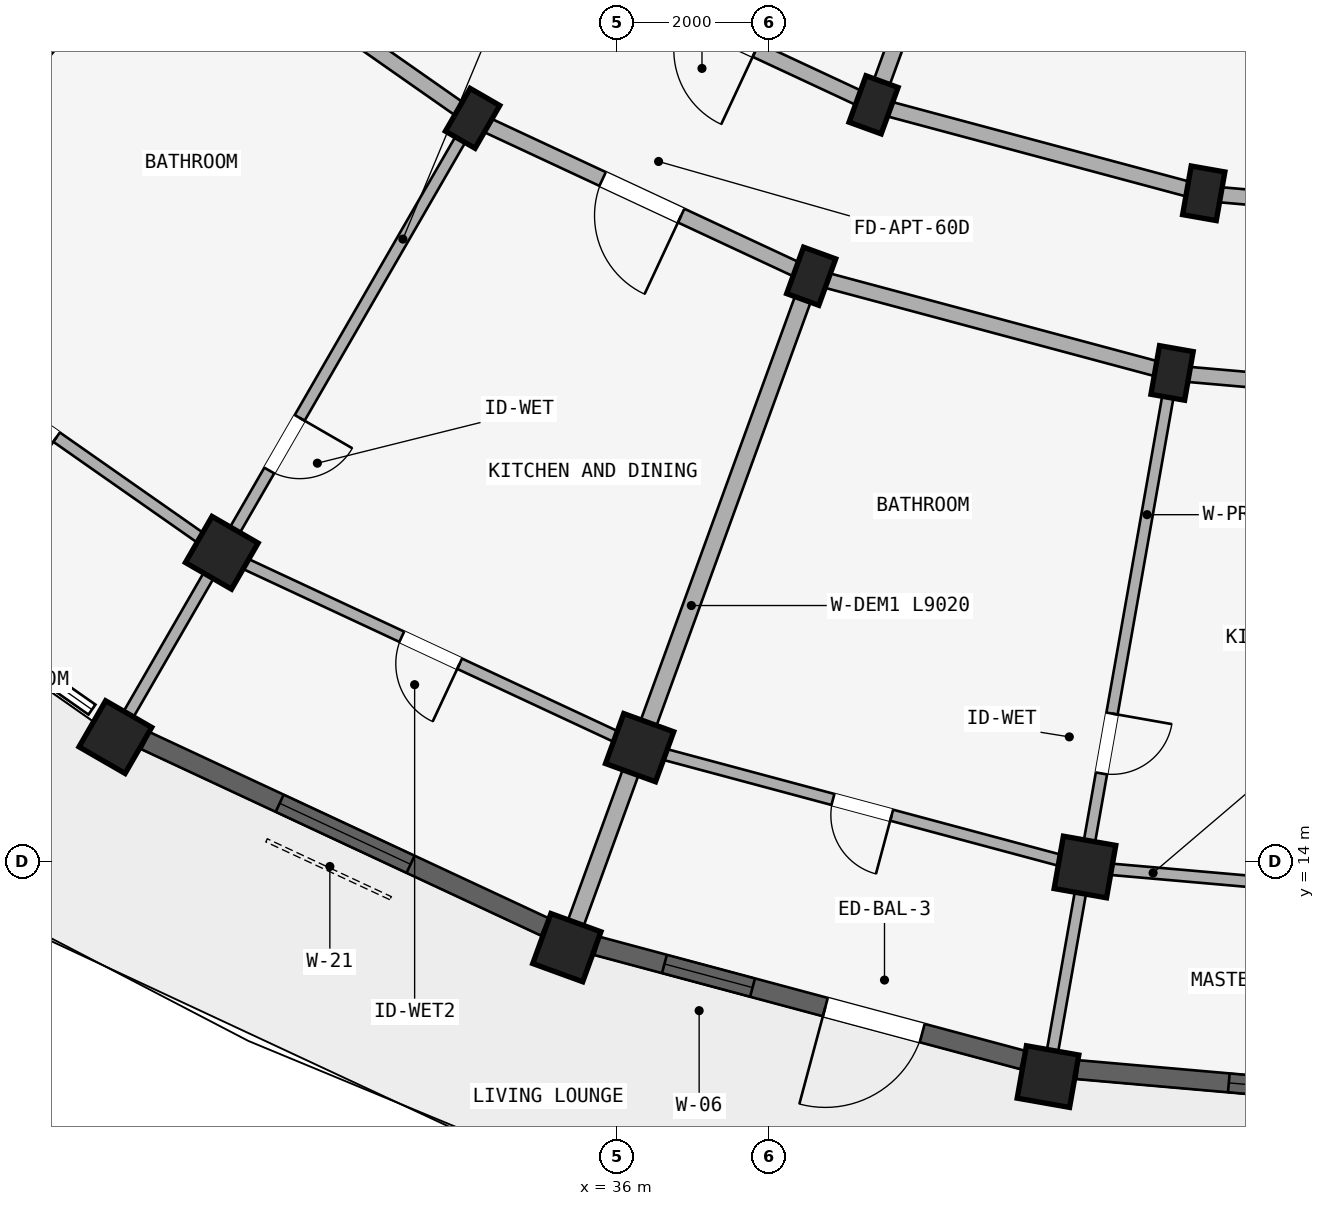
"""IFC4 building model, lengths in metres.
Left out: names, types, materials, properties, quantities, classifications, styles, units other than length and angle.
Written with IfcOpenShell. Run it as: python <this file> out.ifc"""

import sys

from ifc_helpers import new_model, si_unit, direction, frame, frame_2d, origin, origin_2d, place, context, subcontext, project, spatial, rectangle, extrude, element, fill, save


model = new_model("IFC4")
c1 = context("Model", 3, precision=1e-05, world=origin(), true_north=direction((0.0, 1.0)))
c2 = subcontext(c1, "Body", "Model", "MODEL_VIEW")
j1 = project(units=[si_unit("LENGTHUNIT", "METRE"), si_unit("PLANEANGLEUNIT", "RADIAN")], contexts=[c1])
p1 = place(None, origin())
s1 = spatial("IfcSite", under=j1, at=p1, CompositionType="ELEMENT")
p2 = place(p1, origin())
s2 = spatial("IfcBuilding", under=s1, at=p2, CompositionType="ELEMENT")
p3 = place(p2, frame((0.0, 0.0, 27.6)))
s3 = spatial("IfcBuildingStorey", under=s2, at=p3, CompositionType="ELEMENT", Elevation=27.6)
for number, where, z_axis, x_axis in (
    (1, (43.72, 22.792, 0.0), (0.0, 0.0, 1.0), (-0.985, 0.174, 0.0)),
    (2, (43.303, 20.428, 0.0), (0.0, 0.0, 1.0), (-0.985, 0.174, 0.0)),
):
    element("IfcColumn", number, at=place(p3, frame(where, z_axis=z_axis, x_axis=x_axis)), inside=s3, PredefinedType="COLUMN", context=c2, shape_type="SweptSolid", body=[
        extrude(rectangle(XDim=0.45, YDim=0.65, at=origin_2d()), origin(), (0.0, 0.0, 1.0), 2.93),
    ])
p4 = place(p3, frame((42.157, 13.929, 0.0), z_axis=(0.0, 0.0, 1.0), x_axis=(-0.984807753012, 0.173648177667, 0.0)))
e3 = element("IfcColumn", 3, at=p4, inside=s3, PredefinedType="COLUMN", context=c2, shape_type="SweptSolid", body=[
    extrude(rectangle(XDim=0.7, YDim=0.7, at=origin_2d()), origin(), (0.0, 0.0, 1.0), 2.93),
])
p5 = place(p3, frame((41.671, 11.171, 0.0), z_axis=(0.0, 0.0, 1.0), x_axis=(-0.984807753012, 0.173648177667, 0.0)))
e4 = element("IfcColumn", 4, at=p5, inside=s3, PredefinedType="COLUMN", context=c2, shape_type="SweptSolid", body=[
    extrude(rectangle(XDim=0.7, YDim=0.7, at=origin_2d()), origin(), (0.0, 0.0, 1.0), 2.97),
])
for number, where, z_axis, x_axis in (
    (5, (39.376, 23.956, 0.0), (0.0, 0.0, 1.0), (-0.94, 0.342, 0.0)),
    (6, (38.555, 21.701, 0.0), (0.0, 0.0, 1.0), (-0.94, 0.342, 0.0)),
):
    element("IfcColumn", number, at=place(p3, frame(where, z_axis=z_axis, x_axis=x_axis)), inside=s3, PredefinedType="COLUMN", context=c2, shape_type="SweptSolid", body=[
        extrude(rectangle(XDim=0.45, YDim=0.65, at=origin_2d()), origin(), (0.0, 0.0, 1.0), 2.93),
    ])
p6 = place(p3, frame((36.298, 15.499, 0.0), z_axis=(0.0, 0.0, 1.0), x_axis=(-0.939692620786, 0.342020143326, 0.0)))
e7 = element("IfcColumn", 7, at=p6, inside=s3, PredefinedType="COLUMN", context=c2, shape_type="SweptSolid", body=[
    extrude(rectangle(XDim=0.7, YDim=0.7, at=origin_2d()), origin(), (0.0, 0.0, 1.0), 2.93),
])
p7 = place(p3, frame((35.34, 12.868, 0.0), z_axis=(0.0, 0.0, 1.0), x_axis=(-0.939692620786, 0.342020143326, 0.0)))
e8 = element("IfcColumn", 8, at=p7, inside=s3, PredefinedType="COLUMN", context=c2, shape_type="SweptSolid", body=[
    extrude(rectangle(XDim=0.7, YDim=0.7, at=origin_2d()), origin(), (0.0, 0.0, 1.0), 2.97),
])
p8 = place(p3, frame((34.1, 23.778, 0.0), z_axis=(0.0, 0.0, 1.0), x_axis=(-0.866025403784, 0.5, 0.0)))
e9 = element("IfcColumn", 9, at=p8, inside=s3, PredefinedType="COLUMN", context=c2, shape_type="SweptSolid", body=[
    extrude(rectangle(XDim=0.45, YDim=0.65, at=origin_2d()), origin(), (0.0, 0.0, 1.0), 2.93),
])
p9 = place(p3, frame((30.8, 18.062, 0.0), z_axis=(0.0, 0.0, 1.0), x_axis=(-0.866025403784, 0.5, 0.0)))
e10 = element("IfcColumn", 10, at=p9, inside=s3, PredefinedType="COLUMN", context=c2, shape_type="SweptSolid", body=[
    extrude(rectangle(XDim=0.7, YDim=0.7, at=origin_2d()), origin(), (0.0, 0.0, 1.0), 2.93),
])
p10 = place(p3, frame((29.4, 15.637, 0.0), z_axis=(0.0, 0.0, 1.0), x_axis=(-0.866025403784, 0.5, 0.0)))
e11 = element("IfcColumn", 11, at=p10, inside=s3, PredefinedType="COLUMN", context=c2, shape_type="SweptSolid", body=[
    extrude(rectangle(XDim=0.7, YDim=0.7, at=origin_2d()), origin(), (0.0, 0.0, 1.0), 2.97),
])
p11 = place(p3, frame((48.2, 22.4, 0.0), z_axis=(0.0, 0.0, 1.0), x_axis=(-0.996191949488, 0.087187153726, 0.0)))
e12 = element("IfcWall", 12, at=p11, inside=s3, PredefinedType="STANDARD", context=c2, shape_type="SweptSolid", body=[
    extrude(rectangle(XDim=4.497, YDim=0.2, at=frame_2d((2.249, 0.0))), origin(), (0.0, 0.0, 1.0), 2.372),
])
p12 = place(p11, frame((1.729, 0.0, 0.0)))
e13 = element("IfcOpeningElement", 13, at=p12, cuts=e12, PredefinedType="OPENING", context=c2, shape_type="SweptSolid", body=[
    extrude(rectangle(XDim=1.04, YDim=2.15, at=frame_2d((0.52, 1.075))), frame((0.0, 0.11, 0.0), z_axis=(0.0, -1.0, 0.0), x_axis=(1.0, 0.0, 0.0)), (0.0, 0.0, 1.0), 0.22),
])
p13 = place(p3, frame((48.2, 20.0, 0.0), z_axis=(0.0, 0.0, 1.0), x_axis=(-0.996193663584, 0.087167566415, 0.0)))
e14 = element("IfcWall", 14, at=p13, inside=s3, PredefinedType="STANDARD", context=c2, shape_type="SweptSolid", body=[
    extrude(rectangle(XDim=4.916, YDim=0.2, at=frame_2d((2.458, 0.0))), origin(), (0.0, 0.0, 1.0), 2.372),
])
p14 = place(p13, frame((1.918, 0.0, 0.0)))
e15 = element("IfcOpeningElement", 15, at=p14, cuts=e14, PredefinedType="OPENING", context=c2, shape_type="SweptSolid", body=[
    extrude(rectangle(XDim=1.08, YDim=2.15, at=frame_2d((0.54, 1.075))), frame((0.0, 0.11, 0.0), z_axis=(0.0, -1.0, 0.0), x_axis=(1.0, 0.0, 0.0)), (0.0, 0.0, 1.0), 0.22),
])
p15 = place(p3, frame((43.72, 22.792, 0.0), z_axis=(0.0, 0.0, 1.0), x_axis=(-0.965934240054, 0.258787642463, 0.0)))
e16 = element("IfcWall", 16, at=p15, inside=s3, PredefinedType="STANDARD", context=c2, shape_type="SweptSolid", body=[
    extrude(rectangle(XDim=4.497, YDim=0.2, at=frame_2d((2.249, 0.0))), origin(), (0.0, 0.0, 1.0), 2.372),
])
p16 = place(p3, frame((43.303, 20.428, 0.0), z_axis=(0.0, 0.0, 1.0), x_axis=(-0.965930095386, 0.258803112091, 0.0)))
e17 = element("IfcWall", 17, at=p16, inside=s3, PredefinedType="STANDARD", context=c2, shape_type="SweptSolid", body=[
    extrude(rectangle(XDim=4.916, YDim=0.2, at=frame_2d((2.458, 0.0))), origin(), (0.0, 0.0, 1.0), 2.372),
])
p17 = place(p3, frame((39.376, 23.956, 0.0), z_axis=(0.0, 0.0, 1.0), x_axis=(-0.906307919131, 0.422617978463, 0.0)))
e18 = element("IfcWall", 18, at=p17, inside=s3, PredefinedType="STANDARD", context=c2, shape_type="SweptSolid", body=[
    extrude(rectangle(XDim=4.497, YDim=0.2, at=frame_2d((2.249, 0.0))), origin(), (0.0, 0.0, 1.0), 2.372),
])
p18 = place(p17, frame((1.709, 0.0, 0.0)))
e19 = element("IfcOpeningElement", 19, at=p18, cuts=e18, PredefinedType="OPENING", context=c2, shape_type="SweptSolid", body=[
    extrude(rectangle(XDim=1.08, YDim=2.15, at=frame_2d((0.54, 1.075))), frame((0.0, 0.11, 0.0), z_axis=(0.0, -1.0, 0.0), x_axis=(1.0, 0.0, 0.0)), (0.0, 0.0, 1.0), 0.22),
])
p19 = place(p3, frame((38.555, 21.701, 0.0), z_axis=(0.0, 0.0, 1.0), x_axis=(-0.906302381024, 0.422629854778, 0.0)))
e20 = element("IfcWall", 20, at=p19, inside=s3, PredefinedType="STANDARD", context=c2, shape_type="SweptSolid", body=[
    extrude(rectangle(XDim=4.915, YDim=0.2, at=frame_2d((2.458, 0.0))), origin(), (0.0, 0.0, 1.0), 2.372),
])
p20 = place(p19, frame((1.888, 0.0, 0.0)))
e21 = element("IfcOpeningElement", 21, at=p20, cuts=e20, PredefinedType="OPENING", context=c2, shape_type="SweptSolid", body=[
    extrude(rectangle(XDim=1.14, YDim=2.15, at=frame_2d((0.57, 1.075))), frame((0.0, 0.11, 0.0), z_axis=(0.0, -1.0, 0.0), x_axis=(1.0, 0.0, 0.0)), (0.0, 0.0, 1.0), 0.22),
])
p21 = place(p3, frame((34.1, 23.778, 0.0), z_axis=(0.0, 0.0, 1.0), x_axis=(-0.819140911474, 0.573592335331, 0.0)))
e22 = element("IfcWall", 22, at=p21, inside=s3, PredefinedType="STANDARD", context=c2, shape_type="SweptSolid", body=[
    extrude(rectangle(XDim=4.916, YDim=0.2, at=frame_2d((2.458, 0.0))), origin(), (0.0, 0.0, 1.0), 2.372),
])
p22 = place(p3, frame((43.286, 20.33, 0.0), z_axis=(0.0, 0.0, 1.0), x_axis=(-0.173635554464, -0.98480997874, 0.0)))
e23 = element("IfcWall", 23, at=p22, inside=s3, PredefinedType="PARTITIONING", context=c2, shape_type="SweptSolid", body=[
    extrude(rectangle(XDim=9.02, YDim=0.15, at=frame_2d((4.51, 0.0))), origin(), (0.0, 0.0, 1.0), 2.372),
])
p23 = place(p22, frame((4.45, 0.0, 0.0)))
e24 = element("IfcOpeningElement", 24, at=p23, cuts=e23, PredefinedType="OPENING", context=c2, shape_type="SweptSolid", body=[
    extrude(rectangle(XDim=0.8, YDim=2.1, at=frame_2d((0.4, 1.05))), frame((0.0, 0.085, 0.0), z_axis=(0.0, -1.0, 0.0), x_axis=(1.0, 0.0, 0.0)), (0.0, 0.0, 1.0), 0.17),
])
p24 = place(p3, frame((41.702, 30.346, 0.0), z_axis=(0.0, 0.0, 1.0), x_axis=(-0.342010221662, -0.939696231917, 0.0)))
e25 = element("IfcWall", 25, at=p24, inside=s3, PredefinedType="STANDARD", context=c2, shape_type="SweptSolid", body=[
    extrude(rectangle(XDim=6.75, YDim=0.22, at=frame_2d((3.375, 0.0))), origin(), (0.0, 0.0, 1.0), 2.372),
])
p25 = place(p3, frame((38.521, 21.607, 0.0), z_axis=(0.0, 0.0, 1.0), x_axis=(-0.342012528828, -0.939695392201, 0.0)))
e26 = element("IfcWall", 26, at=p25, inside=s3, PredefinedType="STANDARD", context=c2, shape_type="SweptSolid", body=[
    extrude(rectangle(XDim=9.02, YDim=0.22, at=frame_2d((4.51, 0.0))), origin(), (0.0, 0.0, 1.0), 2.372),
])
p26 = place(p3, frame((34.05, 23.691, 0.0), z_axis=(0.0, 0.0, 1.0), x_axis=(-0.500002045973, -0.866024222538, 0.0)))
e27 = element("IfcWall", 27, at=p26, inside=s3, PredefinedType="PARTITIONING", context=c2, shape_type="SweptSolid", body=[
    extrude(rectangle(XDim=9.02, YDim=0.15, at=frame_2d((4.51, 0.0))), origin(), (0.0, 0.0, 1.0), 2.372),
])
p27 = place(p26, frame((4.45, 0.0, 0.0)))
e28 = element("IfcOpeningElement", 28, at=p27, cuts=e27, PredefinedType="OPENING", context=c2, shape_type="SweptSolid", body=[
    extrude(rectangle(XDim=0.8, YDim=2.1, at=frame_2d((0.4, 1.05))), frame((0.0, 0.085, 0.0), z_axis=(0.0, -1.0, 0.0), x_axis=(1.0, 0.0, 0.0)), (0.0, 0.0, 1.0), 0.17),
])
p28 = place(p3, frame((30.009, 26.521, 0.0), z_axis=(0.0, 0.0, 1.0), x_axis=(-0.642784468535, -0.766047078847, 0.0)))
e29 = element("IfcWall", 29, at=p28, inside=s3, PredefinedType="STANDARD", context=c2, shape_type="SweptSolid", body=[
    extrude(rectangle(XDim=9.02, YDim=0.22, at=frame_2d((4.51, 0.0))), origin(), (0.0, 0.0, 1.0), 2.372),
])
p29 = place(p3, frame((48.2, 13.4, 0.0), z_axis=(0.0, 0.0, 1.0), x_axis=(-0.996193018494, 0.087174938512, 0.0)))
e30 = element("IfcWall", 30, at=p29, inside=s3, PredefinedType="PLUMBINGWALL", context=c2, shape_type="SweptSolid", body=[
    extrude(rectangle(XDim=6.066, YDim=0.15, at=frame_2d((3.033, 0.0))), origin(), (0.0, 0.0, 1.0), 2.372),
])
p30 = place(p29, frame((2.653, 0.0, 0.0)))
e31 = element("IfcOpeningElement", 31, at=p30, cuts=e30, PredefinedType="OPENING", context=c2, shape_type="SweptSolid", body=[
    extrude(rectangle(XDim=0.76, YDim=2.05, at=frame_2d((0.38, 1.025))), frame((0.0, 0.085, 0.0), z_axis=(0.0, -1.0, 0.0), x_axis=(1.0, 0.0, 0.0)), (0.0, 0.0, 1.0), 0.17),
])
p31 = place(p3, frame((42.157, 13.929, 0.0), z_axis=(0.0, 0.0, 1.0), x_axis=(-0.965923618901, 0.258827283048, 0.0)))
e32 = element("IfcWall", 32, at=p31, inside=s3, PredefinedType="PLUMBINGWALL", context=c2, shape_type="SweptSolid", body=[
    extrude(rectangle(XDim=6.066, YDim=0.15, at=frame_2d((3.033, 0.0))), origin(), (0.0, 0.0, 1.0), 2.372),
])
p32 = place(p31, frame((2.633, 0.0, 0.0)))
e33 = element("IfcOpeningElement", 33, at=p32, cuts=e32, PredefinedType="OPENING", context=c2, shape_type="SweptSolid", body=[
    extrude(rectangle(XDim=0.8, YDim=2.1, at=frame_2d((0.4, 1.05))), frame((0.0, 0.085, 0.0), z_axis=(0.0, -1.0, 0.0), x_axis=(1.0, 0.0, 0.0)), (0.0, 0.0, 1.0), 0.17),
])
p33 = place(p3, frame((36.298, 15.499, 0.0), z_axis=(0.0, 0.0, 1.0), x_axis=(-0.906312656069, 0.42260781991, 0.0)))
e34 = element("IfcWall", 34, at=p33, inside=s3, PredefinedType="PLUMBINGWALL", context=c2, shape_type="SweptSolid", body=[
    extrude(rectangle(XDim=6.066, YDim=0.15, at=frame_2d((3.033, 0.0))), origin(), (0.0, 0.0, 1.0), 2.372),
])
p34 = place(p33, frame((2.613, 0.0, 0.0)))
e35 = element("IfcOpeningElement", 35, at=p34, cuts=e34, PredefinedType="OPENING", context=c2, shape_type="SweptSolid", body=[
    extrude(rectangle(XDim=0.84, YDim=2.1, at=frame_2d((0.42, 1.05))), frame((0.0, 0.085, 0.0), z_axis=(0.0, -1.0, 0.0), x_axis=(1.0, 0.0, 0.0)), (0.0, 0.0, 1.0), 0.17),
])
p35 = place(p3, frame((30.8, 18.062, 0.0), z_axis=(0.0, 0.0, 1.0), x_axis=(-0.81913926159, 0.573594691504, 0.0)))
e36 = element("IfcWall", 36, at=p35, inside=s3, PredefinedType="PLUMBINGWALL", context=c2, shape_type="SweptSolid", body=[
    extrude(rectangle(XDim=6.066, YDim=0.15, at=frame_2d((3.033, 0.0))), origin(), (0.0, 0.0, 1.0), 2.372),
])
p36 = place(p35, frame((2.653, 0.0, 0.0)))
e37 = element("IfcOpeningElement", 37, at=p36, cuts=e36, PredefinedType="OPENING", context=c2, shape_type="SweptSolid", body=[
    extrude(rectangle(XDim=0.76, YDim=2.05, at=frame_2d((0.38, 1.025))), frame((0.0, 0.085, 0.0), z_axis=(0.0, -1.0, 0.0), x_axis=(1.0, 0.0, 0.0)), (0.0, 0.0, 1.0), 0.17),
])
p37 = place(p3, frame((47.836, 10.757, 0.0), z_axis=(0.0, 0.0, 1.0), x_axis=(-0.996196092027, 0.087139808523, 0.0)))
e38 = element("IfcWall", 38, at=p37, inside=s3, PredefinedType="STANDARD", context=c2, shape_type="SweptSolid", body=[
    extrude(rectangle(XDim=5.802, YDim=0.25, at=frame_2d((2.901, 0.0))), origin(), (0.0, 0.0, 1.0), 2.48),
])
p38 = place(p37, frame((2.001, 0.0, 0.63)))
e39 = element("IfcOpeningElement", 39, at=p38, cuts=e38, PredefinedType="OPENING", context=c2, shape_type="SweptSolid", body=[
    extrude(rectangle(XDim=1.8, YDim=1.65, at=frame_2d((0.9, 0.825))), frame((0.0, 0.135, 0.0), z_axis=(0.0, -1.0, 0.0), x_axis=(1.0, 0.0, 0.0)), (0.0, 0.0, 1.0), 0.27),
])
p39 = place(p3, frame((41.34, 11.389, 0.0), z_axis=(0.0, 0.0, 1.0), x_axis=(-0.965918563855, 0.258846147355, 0.0)))
e40 = element("IfcWall", 40, at=p39, inside=s3, PredefinedType="STANDARD", context=c2, shape_type="SweptSolid", body=[
    extrude(rectangle(XDim=5.802, YDim=0.25, at=frame_2d((2.901, 0.0))), origin(), (0.0, 0.0, 1.0), 2.48),
])
p40 = place(p39, frame((3.682, 0.0, 0.38)))
e41 = element("IfcOpeningElement", 41, at=p40, cuts=e40, PredefinedType="OPENING", context=c2, shape_type="SweptSolid", body=[
    extrude(rectangle(XDim=1.2, YDim=1.5, at=frame_2d((0.6, 0.75))), frame((0.0, 0.135, 0.0), z_axis=(0.0, -1.0, 0.0), x_axis=(1.0, 0.0, 0.0)), (0.0, 0.0, 1.0), 0.27),
])
p41 = place(p39, frame((1.371, 0.0, 0.0)))
e42 = element("IfcOpeningElement", 42, at=p41, cuts=e40, PredefinedType="OPENING", context=c2, shape_type="SweptSolid", body=[
    extrude(rectangle(XDim=1.32, YDim=2.15, at=frame_2d((0.66, 1.075))), frame((0.0, 0.135, 0.0), z_axis=(0.0, -1.0, 0.0), x_axis=(1.0, 0.0, 0.0)), (0.0, 0.0, 1.0), 0.27),
])
p42 = place(p3, frame((35.052, 13.14, 0.0), z_axis=(0.0, 0.0, 1.0), x_axis=(-0.906312089251, 0.422609035489, 0.0)))
e43 = element("IfcWall", 43, at=p42, inside=s3, PredefinedType="STANDARD", context=c2, shape_type="SweptSolid", body=[
    extrude(rectangle(XDim=5.802, YDim=0.25, at=frame_2d((2.901, 0.0))), origin(), (0.0, 0.0, 1.0), 2.48),
])
p43 = place(p42, frame((1.951, 0.0, 0.53)))
e44 = element("IfcOpeningElement", 44, at=p43, cuts=e43, PredefinedType="OPENING", context=c2, shape_type="SweptSolid", body=[
    extrude(rectangle(XDim=1.9, YDim=1.75, at=frame_2d((0.95, 0.875))), frame((0.0, 0.135, 0.0), z_axis=(0.0, -1.0, 0.0), x_axis=(1.0, 0.0, 0.0)), (0.0, 0.0, 1.0), 0.27),
])
p44 = place(p38, origin())
e45 = element("IfcWindow", 45, at=p44, inside=s3, PartitioningType="DOUBLE_PANEL_VERTICAL", PredefinedType="WINDOW", context=c2, shape_type="SweptSolid", body=[
    extrude(rectangle(XDim=1.8, YDim=1.65, at=frame_2d((0.9, 0.825))), frame((0.0, 0.03, 0.0), z_axis=(0.0, -1.0, 0.0), x_axis=(1.0, 0.0, 0.0)), (0.0, 0.0, 1.0), 0.06),
])
fill(e39, e45)
p45 = place(p40, origin())
e46 = element("IfcWindow", 46, at=p45, inside=s3, PartitioningType="SINGLE_PANEL", PredefinedType="WINDOW", context=c2, shape_type="SweptSolid", body=[
    extrude(rectangle(XDim=1.2, YDim=1.5, at=frame_2d((0.6, 0.75))), frame((0.0, 0.03, 0.0), z_axis=(0.0, -1.0, 0.0), x_axis=(1.0, 0.0, 0.0)), (0.0, 0.0, 1.0), 0.06),
])
fill(e41, e46)
p46 = place(p43, origin())
e47 = element("IfcWindow", 47, at=p46, inside=s3, PartitioningType="DOUBLE_PANEL_VERTICAL", PredefinedType="WINDOW", context=c2, shape_type="SweptSolid", body=[
    extrude(rectangle(XDim=1.9, YDim=1.75, at=frame_2d((0.95, 0.875))), frame((0.0, 0.03, 0.0), z_axis=(0.0, -1.0, 0.0), x_axis=(1.0, 0.0, 0.0)), (0.0, 0.0, 1.0), 0.06),
])
fill(e44, e47)
p47 = place(p23, origin())
e48 = element("IfcDoor", 48, at=p47, inside=s3, OperationType="SINGLE_SWING_LEFT", PredefinedType="DOOR", context=c2, shape_type="SweptSolid", body=[
    extrude(rectangle(XDim=0.8, YDim=2.1, at=frame_2d((0.4, 1.05))), frame((0.0, 0.025, 0.0), z_axis=(0.0, -1.0, 0.0), x_axis=(1.0, 0.0, 0.0)), (0.0, 0.0, 1.0), 0.05),
])
fill(e24, e48)
p48 = place(p27, frame((0.8, 0.0, 0.0), z_axis=(0.0, 0.0, 1.0), x_axis=(-1.0, 0.0, 0.0)))
e49 = element("IfcDoor", 49, at=p48, inside=s3, OperationType="SINGLE_SWING_RIGHT", PredefinedType="DOOR", context=c2, shape_type="SweptSolid", body=[
    extrude(rectangle(XDim=0.8, YDim=2.1, at=frame_2d((0.4, 1.05))), frame((0.0, 0.025, 0.0), z_axis=(0.0, -1.0, 0.0), x_axis=(1.0, 0.0, 0.0)), (0.0, 0.0, 1.0), 0.05),
])
fill(e28, e49)
p49 = place(p32, frame((0.8, 0.0, 0.0), z_axis=(0.0, 0.0, 1.0), x_axis=(-1.0, 0.0, 0.0)))
e50 = element("IfcDoor", 50, at=p49, inside=s3, OperationType="SINGLE_SWING_RIGHT", PredefinedType="DOOR", context=c2, shape_type="SweptSolid", body=[
    extrude(rectangle(XDim=0.8, YDim=2.1, at=frame_2d((0.4, 1.05))), frame((0.0, 0.025, 0.0), z_axis=(0.0, -1.0, 0.0), x_axis=(1.0, 0.0, 0.0)), (0.0, 0.0, 1.0), 0.05),
])
fill(e33, e50)
p50 = place(p20, origin())
e51 = element("IfcDoor", 51, at=p50, inside=s3, OperationType="SINGLE_SWING_LEFT", PredefinedType="DOOR", context=c2, shape_type="SweptSolid", body=[
    extrude(rectangle(XDim=1.14, YDim=2.15, at=frame_2d((0.57, 1.075))), frame((0.0, 0.025, 0.0), z_axis=(0.0, -1.0, 0.0), x_axis=(1.0, 0.0, 0.0)), (0.0, 0.0, 1.0), 0.05),
])
fill(e21, e51)
p51 = place(p34, frame((0.84, 0.0, 0.0), z_axis=(0.0, 0.0, 1.0), x_axis=(-1.0, 0.0, 0.0)))
e52 = element("IfcDoor", 52, at=p51, inside=s3, OperationType="SINGLE_SWING_RIGHT", PredefinedType="DOOR", context=c2, shape_type="SweptSolid", body=[
    extrude(rectangle(XDim=0.84, YDim=2.1, at=frame_2d((0.42, 1.05))), frame((0.0, 0.025, 0.0), z_axis=(0.0, -1.0, 0.0), x_axis=(1.0, 0.0, 0.0)), (0.0, 0.0, 1.0), 0.05),
])
fill(e35, e52)
p52 = place(p36, origin())
e53 = element("IfcDoor", 53, at=p52, inside=s3, OperationType="SINGLE_SWING_LEFT", PredefinedType="DOOR", context=c2, shape_type="SweptSolid", body=[
    extrude(rectangle(XDim=0.76, YDim=2.05, at=frame_2d((0.38, 1.025))), frame((0.0, 0.025, 0.0), z_axis=(0.0, -1.0, 0.0), x_axis=(1.0, 0.0, 0.0)), (0.0, 0.0, 1.0), 0.05),
])
fill(e37, e53)
p53 = place(p41, origin())
e54 = element("IfcDoor", 54, at=p53, inside=s3, OperationType="SINGLE_SWING_RIGHT", PredefinedType="DOOR", context=c2, shape_type="SweptSolid", body=[
    extrude(rectangle(XDim=1.32, YDim=2.15, at=frame_2d((0.66, 1.075))), frame((0.0, 0.025, 0.0), z_axis=(0.0, -1.0, 0.0), x_axis=(1.0, 0.0, 0.0)), (0.0, 0.0, 1.0), 0.05),
])
fill(e42, e54)
save(model, sys.argv[1])
